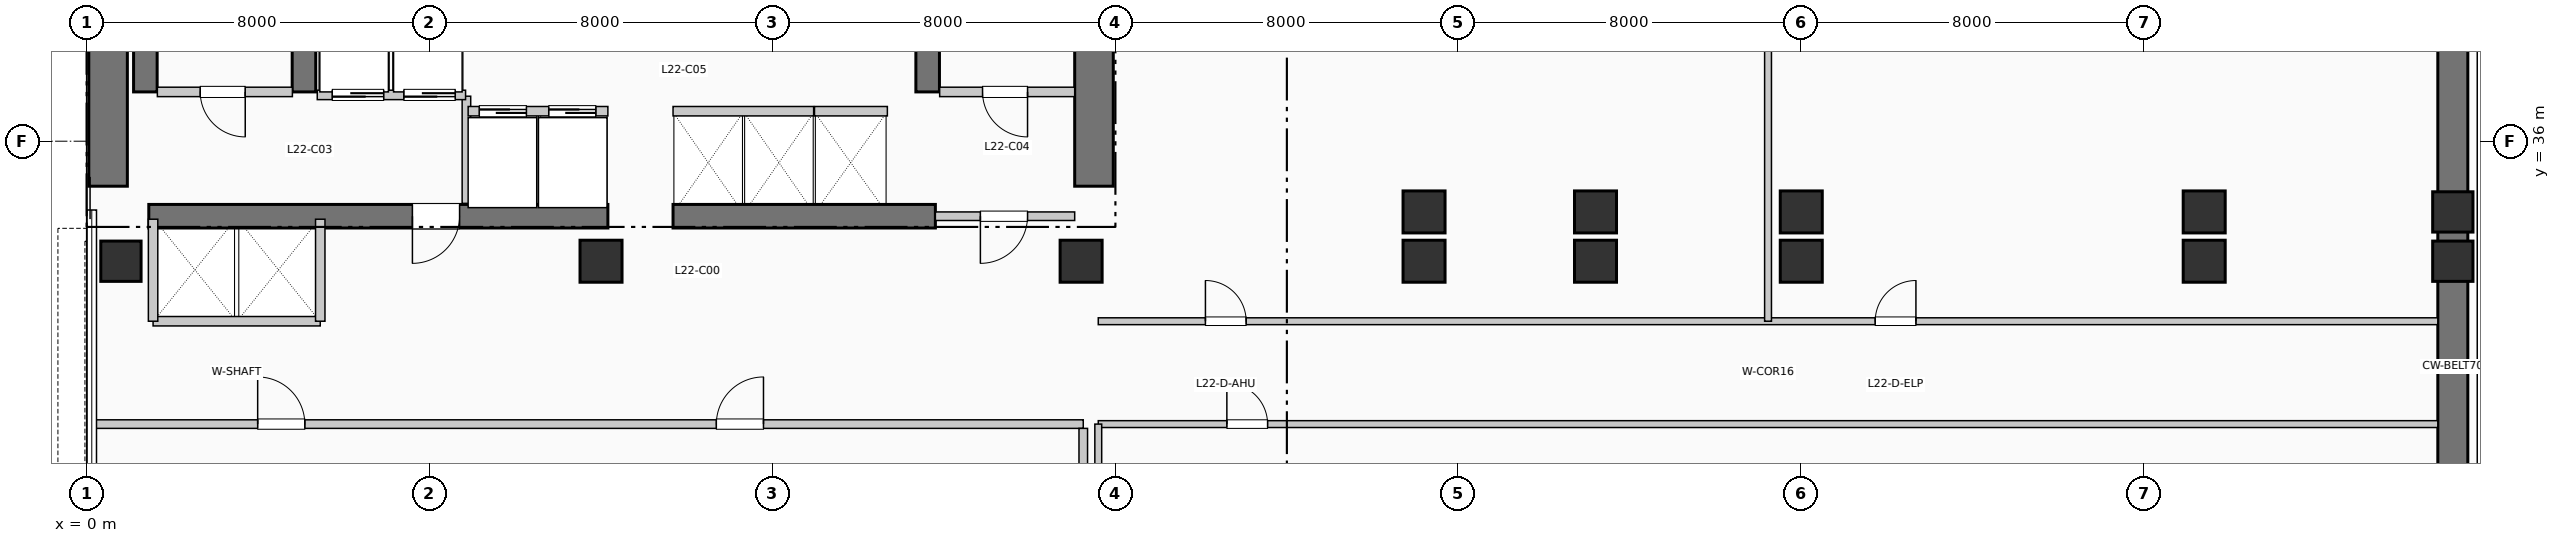
"""IFC4 building model, lengths in metres.
Left out: names, types, materials, properties, quantities, classifications, styles, units other than length and angle.
Written with IfcOpenShell. Run it as: python <this file> out.ifc"""

import sys

from ifc_helpers import new_model, si_unit, direction, frame, frame_2d, origin, origin_2d, place, context, subcontext, project, spatial, rectangle, extrude, element, fill, save


model = new_model("IFC4")
c1 = context("Model", 3, precision=1e-05, world=origin(), true_north=direction((0.0, 1.0)))
c2 = subcontext(c1, "Body", "Model", "MODEL_VIEW")
j1 = project(units=[si_unit("LENGTHUNIT", "METRE"), si_unit("PLANEANGLEUNIT", "RADIAN")], contexts=[c1])
p1 = place(None, origin())
s1 = spatial("IfcSite", under=j1, at=p1, CompositionType="ELEMENT")
p2 = place(p1, origin())
s2 = spatial("IfcBuilding", under=s1, at=p2, CompositionType="ELEMENT")
p3 = place(p2, frame((0.0, 0.0, 93.72)))
s3 = spatial("IfcBuildingStorey", under=s2, at=p3, CompositionType="ELEMENT", Elevation=93.72)
p4 = place(p3, frame((0.5, 34.95, 0.0), z_axis=(0.0, 0.0, 1.0), x_axis=(0.0, 1.0, 0.0)))
e1 = element("IfcWall", 1, at=p4, inside=s3, PredefinedType="SHEAR", context=c2, shape_type="SweptSolid", body=[
    extrude(rectangle(XDim=7.9, YDim=0.9, at=frame_2d((3.95, 0.0))), origin(), (0.0, 0.0, 1.0), 4.95),
])
p5 = place(p3, frame((23.5, 34.95, 0.0), z_axis=(0.0, 0.0, 1.0), x_axis=(0.0, 1.0, 0.0)))
e2 = element("IfcWall", 2, at=p5, inside=s3, PredefinedType="SHEAR", context=c2, shape_type="SweptSolid", body=[
    extrude(rectangle(XDim=10.64, YDim=0.9, at=frame_2d((5.32, 0.0))), origin(), (0.0, 0.0, 1.0), 4.95),
])
p6 = place(p3, frame((1.45, 34.25, 0.0), z_axis=(0.0, 0.0, 1.0), x_axis=(1.0, 0.0, 0.0)))
e3 = element("IfcWall", 3, at=p6, inside=s3, PredefinedType="SHEAR", context=c2, shape_type="SweptSolid", body=[
    extrude(rectangle(XDim=10.71, YDim=0.55, at=frame_2d((5.355, 0.0))), origin(), (0.0, 0.0, 1.0), 4.95),
])
p7 = place(p6, frame((7.25, 0.0, 0.0), z_axis=(0.0, 0.0, 1.0), x_axis=(-1.0, 0.0, 0.0)))
e4 = element("IfcOpeningElement", 4, at=p7, cuts=e3, PredefinedType="OPENING", context=c2, shape_type="SweptSolid", body=[
    extrude(rectangle(XDim=1.1, YDim=2.15, at=frame_2d((0.55, 1.075))), frame((0.0, 0.285, 0.0), z_axis=(0.0, -1.0, 0.0), x_axis=(1.0, 0.0, 0.0)), (0.0, 0.0, 1.0), 0.57),
])
p8 = place(p3, frame((13.68, 34.25, 0.0), z_axis=(0.0, 0.0, 1.0), x_axis=(1.0, 0.0, 0.0)))
e5 = element("IfcWall", 5, at=p8, inside=s3, PredefinedType="SHEAR", context=c2, shape_type="SweptSolid", body=[
    extrude(rectangle(XDim=6.12, YDim=0.55, at=frame_2d((3.06, 0.0))), origin(), (0.0, 0.0, 1.0), 4.95),
])
for number, where, z_axis, x_axis in (
    (6, (1.37, 37.15, 0.0), (0.0, 0.0, 1.0), (0.0, 1.0, 0.0)),
    (7, (5.07, 37.15, 0.0), (0.0, 0.0, 1.0), (0.0, 1.0, 0.0)),
    (8, (19.62, 37.15, 0.0), (0.0, 0.0, 1.0), (0.0, 1.0, 0.0)),
):
    element("IfcWall", number, at=place(p3, frame(where, z_axis=z_axis, x_axis=x_axis)), inside=s3, PredefinedType="SHEAR", context=c2, shape_type="SweptSolid", body=[
        extrude(rectangle(XDim=7.89, YDim=0.55, at=frame_2d((3.945, 0.0))), origin(), (0.0, 0.0, 1.0), 4.95),
    ])
p9 = place(p3, frame((55.2, 19.5, 0.0), z_axis=(0.0, 0.0, 1.0), x_axis=(0.0, 1.0, 0.0)))
e9 = element("IfcWall", 9, at=p9, inside=s3, PredefinedType="SHEAR", context=c2, shape_type="SweptSolid", body=[
    extrude(rectangle(XDim=24.9, YDim=0.7, at=frame_2d((12.45, 0.0))), origin(), (0.0, 0.0, 1.0), 4.3),
])
p10 = place(p3, frame((0.8, 33.2, 0.0), z_axis=(0.0, 0.0, 1.0), x_axis=(1.0, 0.0, 0.0)))
e10 = element("IfcColumn", 10, at=p10, inside=s3, PredefinedType="COLUMN", context=c2, shape_type="SweptSolid", body=[
    extrude(rectangle(XDim=0.94, YDim=0.94, at=origin_2d()), origin(), (0.0, 0.0, 1.0), 4.95),
])
for number, where, z_axis, x_axis in (
    (11, (12.0, 33.2, 0.0), (0.0, 0.0, 1.0), (1.0, 0.0, 0.0)),
    (12, (23.2, 33.2, 0.0), (0.0, 0.0, 1.0), (1.0, 0.0, 0.0)),
    (13, (31.2, 33.2, 0.0), (0.0, 0.0, 1.0), (1.0, 0.0, 0.0)),
    (14, (31.2, 34.35, 0.0), (0.0, 0.0, 1.0), (1.0, 0.0, 0.0)),
    (15, (35.2, 33.2, 0.0), (0.0, 0.0, 1.0), (1.0, 0.0, 0.0)),
    (16, (35.2, 34.35, 0.0), (0.0, 0.0, 1.0), (1.0, 0.0, 0.0)),
    (17, (40.0, 33.2, 0.0), (0.0, 0.0, 1.0), (1.0, 0.0, 0.0)),
    (18, (40.0, 34.35, 0.0), (0.0, 0.0, 1.0), (1.0, 0.0, 0.0)),
    (19, (49.4, 33.2, 0.0), (0.0, 0.0, 1.0), (1.0, 0.0, 0.0)),
    (20, (49.4, 34.35, 0.0), (0.0, 0.0, 1.0), (1.0, 0.0, 0.0)),
):
    element("IfcColumn", number, at=place(p3, frame(where, z_axis=z_axis, x_axis=x_axis)), inside=s3, PredefinedType="COLUMN", context=c2, shape_type="SweptSolid", body=[
        extrude(rectangle(XDim=0.98, YDim=0.98, at=origin_2d()), origin(), (0.0, 0.0, 1.0), 4.95),
    ])
for number, where, z_axis, x_axis in (
    (21, (55.2, 33.2, 0.0), (0.0, 0.0, 1.0), (1.0, 0.0, 0.0)),
    (22, (55.2, 34.35, 0.0), (0.0, 0.0, 1.0), (1.0, 0.0, 0.0)),
):
    element("IfcColumn", number, at=place(p3, frame(where, z_axis=z_axis, x_axis=x_axis)), inside=s3, PredefinedType="COLUMN", context=c2, shape_type="SweptSolid", body=[
        extrude(rectangle(XDim=0.94, YDim=0.94, at=origin_2d()), origin(), (0.0, 0.0, 1.0), 4.95),
    ])
p11 = place(p3, frame((1.65, 37.15, 0.0), z_axis=(0.0, 0.0, 1.0), x_axis=(1.0, 0.0, 0.0)))
e23 = element("IfcWall", 23, at=p11, inside=s3, PredefinedType="PARTITIONING", context=c2, shape_type="SweptSolid", body=[
    extrude(rectangle(XDim=3.15, YDim=0.22, at=frame_2d((1.575, 0.0))), origin(), (0.0, 0.0, 1.0), 4.7),
])
p12 = place(p11, frame((2.05, 0.0, 0.0), z_axis=(0.0, 0.0, 1.0), x_axis=(-1.0, 0.0, 0.0)))
e24 = element("IfcOpeningElement", 24, at=p12, cuts=e23, PredefinedType="OPENING", context=c2, shape_type="SweptSolid", body=[
    extrude(rectangle(XDim=1.05, YDim=2.15, at=frame_2d((0.525, 1.075))), frame((0.0, 0.12, 0.0), z_axis=(0.0, -1.0, 0.0), x_axis=(1.0, 0.0, 0.0)), (0.0, 0.0, 1.0), 0.24),
])
p13 = place(p3, frame((8.86, 34.55, 0.0), z_axis=(0.0, 0.0, 1.0), x_axis=(0.0, 1.0, 0.0)))
e25 = element("IfcWall", 25, at=p13, inside=s3, PredefinedType="PARTITIONING", context=c2, shape_type="SweptSolid", body=[
    extrude(rectangle(XDim=2.5, YDim=0.2, at=frame_2d((1.25, 0.0))), origin(), (0.0, 0.0, 1.0), 4.7),
])
p14 = place(p3, frame((19.9, 37.15, 0.0), z_axis=(0.0, 0.0, 1.0), x_axis=(1.0, 0.0, 0.0)))
e26 = element("IfcWall", 26, at=p14, inside=s3, PredefinedType="PARTITIONING", context=c2, shape_type="SweptSolid", body=[
    extrude(rectangle(XDim=3.15, YDim=0.22, at=frame_2d((1.575, 0.0))), origin(), (0.0, 0.0, 1.0), 4.7),
])
p15 = place(p14, frame((2.05, 0.0, 0.0), z_axis=(0.0, 0.0, 1.0), x_axis=(-1.0, 0.0, 0.0)))
e27 = element("IfcOpeningElement", 27, at=p15, cuts=e26, PredefinedType="OPENING", context=c2, shape_type="SweptSolid", body=[
    extrude(rectangle(XDim=1.05, YDim=2.15, at=frame_2d((0.525, 1.075))), frame((0.0, 0.12, 0.0), z_axis=(0.0, -1.0, 0.0), x_axis=(1.0, 0.0, 0.0)), (0.0, 0.0, 1.0), 0.24),
])
p16 = place(p3, frame((19.8, 34.25, 0.0), z_axis=(0.0, 0.0, 1.0), x_axis=(1.0, 0.0, 0.0)))
e28 = element("IfcWall", 28, at=p16, inside=s3, PredefinedType="PARTITIONING", context=c2, shape_type="SweptSolid", body=[
    extrude(rectangle(XDim=3.25, YDim=0.2, at=frame_2d((1.625, 0.0))), origin(), (0.0, 0.0, 1.0), 4.7),
])
p17 = place(p16, frame((2.15, 0.0, 0.0), z_axis=(0.0, 0.0, 1.0), x_axis=(-1.0, 0.0, 0.0)))
e29 = element("IfcOpeningElement", 29, at=p17, cuts=e28, PredefinedType="OPENING", context=c2, shape_type="SweptSolid", body=[
    extrude(rectangle(XDim=1.1, YDim=2.15, at=frame_2d((0.55, 1.075))), frame((0.0, 0.11, 0.0), z_axis=(0.0, -1.0, 0.0), x_axis=(1.0, 0.0, 0.0)), (0.0, 0.0, 1.0), 0.22),
])
p18 = place(p3, frame((5.38, 37.08, 0.0), z_axis=(0.0, 0.0, 1.0), x_axis=(1.0, 0.0, 0.0)))
e30 = element("IfcWall", 30, at=p18, inside=s3, PredefinedType="PARTITIONING", context=c2, shape_type="SweptSolid", body=[
    extrude(rectangle(XDim=3.46, YDim=0.22, at=frame_2d((1.73, 0.0))), origin(), (0.0, 0.0, 1.0), 4.7),
])
p19 = place(p18, frame((1.55, 0.0, 0.0), z_axis=(0.0, 0.0, 1.0), x_axis=(-1.0, 0.0, 0.0)))
e31 = element("IfcOpeningElement", 31, at=p19, cuts=e30, PredefinedType="OPENING", context=c2, shape_type="SweptSolid", body=[
    extrude(rectangle(XDim=1.2, YDim=2.2, at=frame_2d((0.6, 1.1))), frame((0.0, 0.12, 0.0), z_axis=(0.0, -1.0, 0.0), x_axis=(1.0, 0.0, 0.0)), (0.0, 0.0, 1.0), 0.24),
])
p20 = place(p18, frame((3.22, 0.0, 0.0), z_axis=(0.0, 0.0, 1.0), x_axis=(-1.0, 0.0, 0.0)))
e32 = element("IfcOpeningElement", 32, at=p20, cuts=e30, PredefinedType="OPENING", context=c2, shape_type="SweptSolid", body=[
    extrude(rectangle(XDim=1.2, YDim=2.2, at=frame_2d((0.6, 1.1))), frame((0.0, 0.12, 0.0), z_axis=(0.0, -1.0, 0.0), x_axis=(1.0, 0.0, 0.0)), (0.0, 0.0, 1.0), 0.24),
])
p21 = place(p3, frame((1.55, 31.8, 0.0), z_axis=(0.0, 0.0, 1.0), x_axis=(1.0, 0.0, 0.0)))
e33 = element("IfcWall", 33, at=p21, inside=s3, PredefinedType="PARTITIONING", context=c2, shape_type="SweptSolid", body=[
    extrude(rectangle(XDim=3.9, YDim=0.22, at=frame_2d((1.95, 0.0))), origin(), (0.0, 0.0, 1.0), 4.7),
])
for number, where, z_axis, x_axis in (
    (34, (1.55, 31.8, 0.0), (0.0, 0.0, 1.0), (0.0, 1.0, 0.0)),
    (35, (5.45, 31.8, 0.0), (0.0, 0.0, 1.0), (0.0, 1.0, 0.0)),
):
    element("IfcWall", number, at=place(p3, frame(where, z_axis=z_axis, x_axis=x_axis)), inside=s3, PredefinedType="PARTITIONING", context=c2, shape_type="SweptSolid", body=[
        extrude(rectangle(XDim=2.38, YDim=0.22, at=frame_2d((1.19, 0.0))), origin(), (0.0, 0.0, 1.0), 4.7),
    ])
p22 = place(p3, frame((8.9, 36.7, 0.0), z_axis=(0.0, 0.0, 1.0), x_axis=(1.0, 0.0, 0.0)))
e36 = element("IfcWall", 36, at=p22, inside=s3, PredefinedType="PARTITIONING", context=c2, shape_type="SweptSolid", body=[
    extrude(rectangle(XDim=3.26, YDim=0.22, at=frame_2d((1.63, 0.0))), origin(), (0.0, 0.0, 1.0), 4.7),
])
p23 = place(p22, frame((0.26, 0.0, 0.0)))
e37 = element("IfcOpeningElement", 37, at=p23, cuts=e36, PredefinedType="OPENING", context=c2, shape_type="SweptSolid", body=[
    extrude(rectangle(XDim=1.1, YDim=2.2, at=frame_2d((0.55, 1.1))), frame((0.0, 0.12, 0.0), z_axis=(0.0, -1.0, 0.0), x_axis=(1.0, 0.0, 0.0)), (0.0, 0.0, 1.0), 0.24),
])
p24 = place(p22, frame((1.88, 0.0, 0.0)))
e38 = element("IfcOpeningElement", 38, at=p24, cuts=e36, PredefinedType="OPENING", context=c2, shape_type="SweptSolid", body=[
    extrude(rectangle(XDim=1.1, YDim=2.2, at=frame_2d((0.55, 1.1))), frame((0.0, 0.12, 0.0), z_axis=(0.0, -1.0, 0.0), x_axis=(1.0, 0.0, 0.0)), (0.0, 0.0, 1.0), 0.24),
])
p25 = place(p3, frame((13.68, 36.7, 0.0), z_axis=(0.0, 0.0, 1.0), x_axis=(1.0, 0.0, 0.0)))
e39 = element("IfcWall", 39, at=p25, inside=s3, PredefinedType="PARTITIONING", context=c2, shape_type="SweptSolid", body=[
    extrude(rectangle(XDim=3.28, YDim=0.22, at=frame_2d((1.64, 0.0))), origin(), (0.0, 0.0, 1.0), 4.7),
])
p26 = place(p3, frame((16.98, 36.7, 0.0), z_axis=(0.0, 0.0, 1.0), x_axis=(1.0, 0.0, 0.0)))
e40 = element("IfcWall", 40, at=p26, inside=s3, PredefinedType="PARTITIONING", context=c2, shape_type="SweptSolid", body=[
    extrude(rectangle(XDim=1.7, YDim=0.22, at=frame_2d((0.85, 0.0))), origin(), (0.0, 0.0, 1.0), 4.7),
])
p27 = place(p3, frame((0.19, 29.4, 0.0), z_axis=(0.0, 0.0, 1.0), x_axis=(1.0, 0.0, 0.0)))
e41 = element("IfcWall", 41, at=p27, inside=s3, PredefinedType="PARTITIONING", context=c2, shape_type="SweptSolid", body=[
    extrude(rectangle(XDim=23.06, YDim=0.2, at=frame_2d((11.53, 0.0))), origin(), (0.0, 0.0, 1.0), 4.355),
])
p28 = place(p27, frame((3.8, 0.0, 0.0)))
e42 = element("IfcOpeningElement", 42, at=p28, cuts=e41, PredefinedType="OPENING", context=c2, shape_type="SweptSolid", body=[
    extrude(rectangle(XDim=1.1, YDim=2.15, at=frame_2d((0.55, 1.075))), frame((0.0, 0.11, 0.0), z_axis=(0.0, -1.0, 0.0), x_axis=(1.0, 0.0, 0.0)), (0.0, 0.0, 1.0), 0.22),
])
p29 = place(p27, frame((14.5, 0.0, 0.0)))
e43 = element("IfcOpeningElement", 43, at=p29, cuts=e41, PredefinedType="OPENING", context=c2, shape_type="SweptSolid", body=[
    extrude(rectangle(XDim=1.1, YDim=2.15, at=frame_2d((0.55, 1.075))), frame((0.0, 0.11, 0.0), z_axis=(0.0, -1.0, 0.0), x_axis=(1.0, 0.0, 0.0)), (0.0, 0.0, 1.0), 0.22),
])
p30 = place(p3, frame((23.25, 1.15, 0.0), z_axis=(0.0, 0.0, 1.0), x_axis=(0.0, 1.0, 0.0)))
e44 = element("IfcWall", 44, at=p30, inside=s3, PredefinedType="PARTITIONING", context=c2, shape_type="SweptSolid", body=[
    extrude(rectangle(XDim=28.15, YDim=0.2, at=frame_2d((14.075, 0.0))), origin(), (0.0, 0.0, 1.0), 3.985),
])
p31 = place(p3, frame((23.6, 31.8, 0.0), z_axis=(0.0, 0.0, 1.0), x_axis=(1.0, 0.0, 0.0)))
e45 = element("IfcWall", 45, at=p31, inside=s3, PredefinedType="PARTITIONING", context=c2, shape_type="SweptSolid", body=[
    extrude(rectangle(XDim=31.25, YDim=0.16, at=frame_2d((15.625, 0.0))), origin(), (0.0, 0.0, 1.0), 4.7),
])
p32 = place(p31, frame((2.5, 0.0, 0.0)))
e46 = element("IfcOpeningElement", 46, at=p32, cuts=e45, PredefinedType="OPENING", context=c2, shape_type="SweptSolid", body=[
    extrude(rectangle(XDim=0.95, YDim=2.1, at=frame_2d((0.475, 1.05))), frame((0.0, 0.09, 0.0), z_axis=(0.0, -1.0, 0.0), x_axis=(1.0, 0.0, 0.0)), (0.0, 0.0, 1.0), 0.18),
])
p33 = place(p31, frame((18.125, 0.0, 0.0)))
e47 = element("IfcOpeningElement", 47, at=p33, cuts=e45, PredefinedType="OPENING", context=c2, shape_type="SweptSolid", body=[
    extrude(rectangle(XDim=0.95, YDim=2.1, at=frame_2d((0.475, 1.05))), frame((0.0, 0.09, 0.0), z_axis=(0.0, -1.0, 0.0), x_axis=(1.0, 0.0, 0.0)), (0.0, 0.0, 1.0), 0.18),
])
p34 = place(p3, frame((39.225, 31.8, 0.0), z_axis=(0.0, 0.0, 1.0), x_axis=(0.0, 1.0, 0.0)))
e48 = element("IfcWall", 48, at=p34, inside=s3, PredefinedType="PARTITIONING", context=c2, shape_type="SweptSolid", body=[
    extrude(rectangle(XDim=14.01, YDim=0.16, at=frame_2d((7.005, 0.0))), origin(), (0.0, 0.0, 1.0), 4.7),
])
p35 = place(p3, frame((23.6, 29.4, 0.0), z_axis=(0.0, 0.0, 1.0), x_axis=(1.0, 0.0, 0.0)))
e49 = element("IfcWall", 49, at=p35, inside=s3, PredefinedType="PARTITIONING", context=c2, shape_type="SweptSolid", body=[
    extrude(rectangle(XDim=31.25, YDim=0.16, at=frame_2d((15.625, 0.0))), origin(), (0.0, 0.0, 1.0), 4.355),
])
p36 = place(p35, frame((3.0, 0.0, 0.0)))
e50 = element("IfcOpeningElement", 50, at=p36, cuts=e49, PredefinedType="OPENING", context=c2, shape_type="SweptSolid", body=[
    extrude(rectangle(XDim=0.95, YDim=2.1, at=frame_2d((0.475, 1.05))), frame((0.0, 0.09, 0.0), z_axis=(0.0, -1.0, 0.0), x_axis=(1.0, 0.0, 0.0)), (0.0, 0.0, 1.0), 0.18),
])
p37 = place(p3, frame((23.6, 18.19, 0.0), z_axis=(0.0, 0.0, 1.0), x_axis=(0.0, 1.0, 0.0)))
e51 = element("IfcWall", 51, at=p37, inside=s3, PredefinedType="PARTITIONING", context=c2, shape_type="SweptSolid", body=[
    extrude(rectangle(XDim=11.21, YDim=0.16, at=frame_2d((5.605, 0.0))), origin(), (0.0, 0.0, 1.0), 3.985),
])
p38 = place(p12, origin())
e52 = element("IfcDoor", 52, at=p38, inside=s3, OperationType="SINGLE_SWING_RIGHT", PredefinedType="DOOR", context=c2, shape_type="SweptSolid", body=[
    extrude(rectangle(XDim=1.05, YDim=2.15, at=frame_2d((0.525, 1.075))), frame((0.0, 0.025, 0.0), z_axis=(0.0, -1.0, 0.0), x_axis=(1.0, 0.0, 0.0)), (0.0, 0.0, 1.0), 0.05),
])
fill(e24, e52)
p39 = place(p7, origin())
e53 = element("IfcDoor", 53, at=p39, inside=s3, OperationType="SINGLE_SWING_LEFT", PredefinedType="DOOR", context=c2, shape_type="SweptSolid", body=[
    extrude(rectangle(XDim=1.1, YDim=2.15, at=frame_2d((0.55, 1.075))), frame((0.0, 0.025, 0.0), z_axis=(0.0, -1.0, 0.0), x_axis=(1.0, 0.0, 0.0)), (0.0, 0.0, 1.0), 0.05),
])
fill(e4, e53)
p40 = place(p15, origin())
e54 = element("IfcDoor", 54, at=p40, inside=s3, OperationType="SINGLE_SWING_RIGHT", PredefinedType="DOOR", context=c2, shape_type="SweptSolid", body=[
    extrude(rectangle(XDim=1.05, YDim=2.15, at=frame_2d((0.525, 1.075))), frame((0.0, 0.025, 0.0), z_axis=(0.0, -1.0, 0.0), x_axis=(1.0, 0.0, 0.0)), (0.0, 0.0, 1.0), 0.05),
])
fill(e27, e54)
p41 = place(p17, origin())
e55 = element("IfcDoor", 55, at=p41, inside=s3, OperationType="SINGLE_SWING_LEFT", PredefinedType="DOOR", context=c2, shape_type="SweptSolid", body=[
    extrude(rectangle(XDim=1.1, YDim=2.15, at=frame_2d((0.55, 1.075))), frame((0.0, 0.025, 0.0), z_axis=(0.0, -1.0, 0.0), x_axis=(1.0, 0.0, 0.0)), (0.0, 0.0, 1.0), 0.05),
])
fill(e29, e55)
p42 = place(p19, origin())
e56 = element("IfcDoor", 56, at=p42, inside=s3, OperationType="SLIDING_TO_RIGHT", PredefinedType="DOOR", context=c2, shape_type="SweptSolid", body=[
    extrude(rectangle(XDim=1.2, YDim=2.2, at=frame_2d((0.6, 1.1))), frame((0.0, 0.025, 0.0), z_axis=(0.0, -1.0, 0.0), x_axis=(1.0, 0.0, 0.0)), (0.0, 0.0, 1.0), 0.05),
])
fill(e31, e56)
p43 = place(p20, origin())
e57 = element("IfcDoor", 57, at=p43, inside=s3, OperationType="SLIDING_TO_RIGHT", PredefinedType="DOOR", context=c2, shape_type="SweptSolid", body=[
    extrude(rectangle(XDim=1.2, YDim=2.2, at=frame_2d((0.6, 1.1))), frame((0.0, 0.025, 0.0), z_axis=(0.0, -1.0, 0.0), x_axis=(1.0, 0.0, 0.0)), (0.0, 0.0, 1.0), 0.05),
])
fill(e32, e57)
p44 = place(p23, origin())
e58 = element("IfcDoor", 58, at=p44, inside=s3, OperationType="SLIDING_TO_LEFT", PredefinedType="DOOR", context=c2, shape_type="SweptSolid", body=[
    extrude(rectangle(XDim=1.1, YDim=2.2, at=frame_2d((0.55, 1.1))), frame((0.0, 0.025, 0.0), z_axis=(0.0, -1.0, 0.0), x_axis=(1.0, 0.0, 0.0)), (0.0, 0.0, 1.0), 0.05),
])
fill(e37, e58)
p45 = place(p24, origin())
e59 = element("IfcDoor", 59, at=p45, inside=s3, OperationType="SLIDING_TO_LEFT", PredefinedType="DOOR", context=c2, shape_type="SweptSolid", body=[
    extrude(rectangle(XDim=1.1, YDim=2.2, at=frame_2d((0.55, 1.1))), frame((0.0, 0.025, 0.0), z_axis=(0.0, -1.0, 0.0), x_axis=(1.0, 0.0, 0.0)), (0.0, 0.0, 1.0), 0.05),
])
fill(e38, e59)
p46 = place(p28, origin())
e60 = element("IfcDoor", 60, at=p46, inside=s3, OperationType="SINGLE_SWING_LEFT", PredefinedType="DOOR", context=c2, shape_type="SweptSolid", body=[
    extrude(rectangle(XDim=1.1, YDim=2.15, at=frame_2d((0.55, 1.075))), frame((0.0, 0.025, 0.0), z_axis=(0.0, -1.0, 0.0), x_axis=(1.0, 0.0, 0.0)), (0.0, 0.0, 1.0), 0.05),
])
fill(e42, e60)
p47 = place(p29, origin())
e61 = element("IfcDoor", 61, at=p47, inside=s3, OperationType="SINGLE_SWING_RIGHT", PredefinedType="DOOR", context=c2, shape_type="SweptSolid", body=[
    extrude(rectangle(XDim=1.1, YDim=2.15, at=frame_2d((0.55, 1.075))), frame((0.0, 0.025, 0.0), z_axis=(0.0, -1.0, 0.0), x_axis=(1.0, 0.0, 0.0)), (0.0, 0.0, 1.0), 0.05),
])
fill(e43, e61)
p48 = place(p32, origin())
e62 = element("IfcDoor", 62, at=p48, inside=s3, OperationType="SINGLE_SWING_LEFT", PredefinedType="DOOR", context=c2, shape_type="SweptSolid", body=[
    extrude(rectangle(XDim=0.95, YDim=2.1, at=frame_2d((0.475, 1.05))), frame((0.0, 0.025, 0.0), z_axis=(0.0, -1.0, 0.0), x_axis=(1.0, 0.0, 0.0)), (0.0, 0.0, 1.0), 0.05),
])
fill(e46, e62)
p49 = place(p33, origin())
e63 = element("IfcDoor", 63, at=p49, inside=s3, OperationType="SINGLE_SWING_RIGHT", PredefinedType="DOOR", context=c2, shape_type="SweptSolid", body=[
    extrude(rectangle(XDim=0.95, YDim=2.1, at=frame_2d((0.475, 1.05))), frame((0.0, 0.025, 0.0), z_axis=(0.0, -1.0, 0.0), x_axis=(1.0, 0.0, 0.0)), (0.0, 0.0, 1.0), 0.05),
])
fill(e47, e63)
p50 = place(p36, origin())
e64 = element("IfcDoor", 64, at=p50, inside=s3, OperationType="SINGLE_SWING_LEFT", PredefinedType="DOOR", context=c2, shape_type="SweptSolid", body=[
    extrude(rectangle(XDim=0.95, YDim=2.1, at=frame_2d((0.475, 1.05))), frame((0.0, 0.025, 0.0), z_axis=(0.0, -1.0, 0.0), x_axis=(1.0, 0.0, 0.0)), (0.0, 0.0, 1.0), 0.05),
])
fill(e50, e64)
save(model, sys.argv[1])
